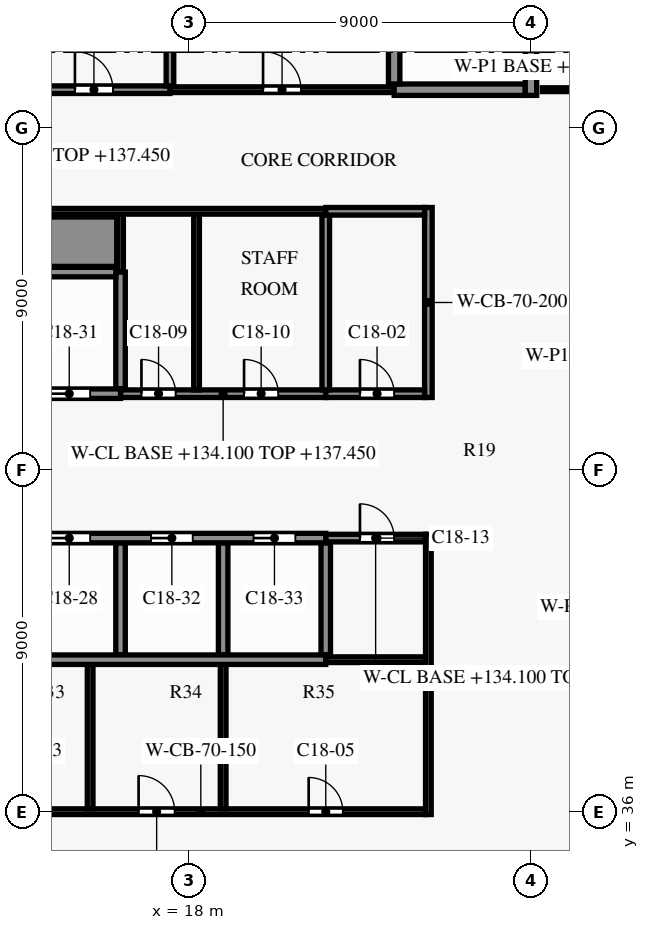
"""IFC4 building model, lengths in metres.
Left out: names, types, materials, properties, quantities, classifications, styles, units other than length and angle.
Written with IfcOpenShell. Run it as: python <this file> out.ifc"""

import sys

from ifc_helpers import new_model, si_unit, direction, frame, frame_2d, origin, place, context, subcontext, project, spatial, rectangle, extrude, element, fill, save


model = new_model("IFC4")
c1 = context("Model", 3, precision=1e-05, world=origin(), true_north=direction((0.0, 1.0)))
c2 = subcontext(c1, "Body", "Model", "MODEL_VIEW")
j1 = project(units=[si_unit("LENGTHUNIT", "METRE"), si_unit("PLANEANGLEUNIT", "RADIAN")], contexts=[c1])
p1 = place(None, origin())
s1 = spatial("IfcSite", under=j1, at=p1, CompositionType="ELEMENT")
p2 = place(p1, origin())
s2 = spatial("IfcBuilding", under=s1, at=p2, CompositionType="ELEMENT")
p3 = place(p2, frame((0.0, 0.0, 134.1)))
s3 = spatial("IfcBuildingStorey", under=s2, at=p3, CompositionType="ELEMENT", Elevation=134.1)
p4 = place(p3, frame((12.4, 36.0, 0.0), z_axis=(0.0, 0.0, 1.0), x_axis=(1.0, 0.0, 0.0)))
e1 = element("IfcWall", 1, at=p4, inside=s3, PredefinedType="SHEAR", context=c2, shape_type="SweptSolid", body=[
    extrude(rectangle(XDim=11.825, YDim=0.15, at=frame_2d((5.913, 0.0))), origin(), (0.0, 0.0, 1.0), 3.5),
])
p5 = place(p4, frame((1.05, 0.0, 0.0)))
e2 = element("IfcOpeningElement", 2, at=p5, cuts=e1, PredefinedType="OPENING", context=c2, shape_type="SweptSolid", body=[
    extrude(rectangle(XDim=0.9, YDim=2.1, at=frame_2d((0.45, 1.05))), frame((0.0, 0.085, 0.0), z_axis=(0.0, -1.0, 0.0), x_axis=(1.0, 0.0, 0.0)), (0.0, 0.0, 1.0), 0.17),
])
p6 = place(p4, frame((4.275, 0.0, 0.0)))
e3 = element("IfcOpeningElement", 3, at=p6, cuts=e1, PredefinedType="OPENING", context=c2, shape_type="SweptSolid", body=[
    extrude(rectangle(XDim=0.95, YDim=2.1, at=frame_2d((0.475, 1.05))), frame((0.0, 0.085, 0.0), z_axis=(0.0, -1.0, 0.0), x_axis=(1.0, 0.0, 0.0)), (0.0, 0.0, 1.0), 0.17),
])
p7 = place(p4, frame((8.75, 0.0, 0.0)))
e4 = element("IfcOpeningElement", 4, at=p7, cuts=e1, PredefinedType="OPENING", context=c2, shape_type="SweptSolid", body=[
    extrude(rectangle(XDim=0.9, YDim=2.1, at=frame_2d((0.45, 1.05))), frame((0.0, 0.085, 0.0), z_axis=(0.0, -1.0, 0.0), x_axis=(1.0, 0.0, 0.0)), (0.0, 0.0, 1.0), 0.17),
])
p8 = place(p3, frame((21.6, 40.0, 0.0), z_axis=(0.0, 0.0, 1.0), x_axis=(1.0, 0.0, 0.0)))
e5 = element("IfcWall", 5, at=p8, inside=s3, PredefinedType="PARTITIONING", context=c2, shape_type="SweptSolid", body=[
    extrude(rectangle(XDim=2.625, YDim=0.15, at=frame_2d((1.312, 0.0))), origin(), (0.0, 0.0, 1.0), 3.35),
])
p9 = place(p3, frame((8.1, 40.0, 0.0), z_axis=(0.0, 0.0, 1.0), x_axis=(1.0, 0.0, 0.0)))
e6 = element("IfcWall", 6, at=p9, inside=s3, PredefinedType="SHEAR", context=c2, shape_type="SweptSolid", body=[
    extrude(rectangle(XDim=13.5, YDim=0.25, at=frame_2d((6.75, 0.0))), origin(), (0.0, 0.0, 1.0), 3.5),
])
p10 = place(p3, frame((21.6, 43.2, 0.0), z_axis=(0.0, 0.0, 1.0), x_axis=(1.0, 0.0, 0.0)))
e7 = element("IfcWall", 7, at=p10, inside=s3, PredefinedType="PARTITIONING", context=c2, shape_type="SweptSolid", body=[
    extrude(rectangle(XDim=2.625, YDim=0.2, at=frame_2d((1.312, 0.0))), origin(), (0.0, 0.0, 1.0), 3.35),
])
p11 = place(p10, frame((0.9, 0.0, 0.0)))
e8 = element("IfcOpeningElement", 8, at=p11, cuts=e7, PredefinedType="OPENING", context=c2, shape_type="SweptSolid", body=[
    extrude(rectangle(XDim=0.9, YDim=2.1, at=frame_2d((0.45, 1.05))), frame((0.0, 0.11, 0.0), z_axis=(0.0, -1.0, 0.0), x_axis=(1.0, 0.0, 0.0)), (0.0, 0.0, 1.0), 0.22),
])
p12 = place(p3, frame((8.1, 43.2, 0.0), z_axis=(0.0, 0.0, 1.0), x_axis=(1.0, 0.0, 0.0)))
e9 = element("IfcWall", 9, at=p12, inside=s3, PredefinedType="SHEAR", context=c2, shape_type="SweptSolid", body=[
    extrude(rectangle(XDim=13.5, YDim=0.25, at=frame_2d((6.75, 0.0))), origin(), (0.0, 0.0, 1.0), 3.5),
])
p13 = place(p12, frame((0.8, 0.0, 0.0)))
e10 = element("IfcOpeningElement", 10, at=p13, cuts=e9, PredefinedType="OPENING", context=c2, shape_type="SweptSolid", body=[
    extrude(rectangle(XDim=1.1, YDim=2.1, at=frame_2d((0.55, 1.05))), frame((0.0, 0.135, 0.0), z_axis=(0.0, -1.0, 0.0), x_axis=(1.0, 0.0, 0.0)), (0.0, 0.0, 1.0), 0.27),
])
p14 = place(p12, frame((3.5, 0.0, 0.0)))
e11 = element("IfcOpeningElement", 11, at=p14, cuts=e9, PredefinedType="OPENING", context=c2, shape_type="SweptSolid", body=[
    extrude(rectangle(XDim=1.1, YDim=2.1, at=frame_2d((0.55, 1.05))), frame((0.0, 0.135, 0.0), z_axis=(0.0, -1.0, 0.0), x_axis=(1.0, 0.0, 0.0)), (0.0, 0.0, 1.0), 0.27),
])
p15 = place(p12, frame((6.2, 0.0, 0.0)))
e12 = element("IfcOpeningElement", 12, at=p15, cuts=e9, PredefinedType="OPENING", context=c2, shape_type="SweptSolid", body=[
    extrude(rectangle(XDim=1.1, YDim=2.1, at=frame_2d((0.55, 1.05))), frame((0.0, 0.135, 0.0), z_axis=(0.0, -1.0, 0.0), x_axis=(1.0, 0.0, 0.0)), (0.0, 0.0, 1.0), 0.27),
])
p16 = place(p12, frame((8.9, 0.0, 0.0)))
e13 = element("IfcOpeningElement", 13, at=p16, cuts=e9, PredefinedType="OPENING", context=c2, shape_type="SweptSolid", body=[
    extrude(rectangle(XDim=1.1, YDim=2.1, at=frame_2d((0.55, 1.05))), frame((0.0, 0.135, 0.0), z_axis=(0.0, -1.0, 0.0), x_axis=(1.0, 0.0, 0.0)), (0.0, 0.0, 1.0), 0.27),
])
p17 = place(p12, frame((11.6, 0.0, 0.0)))
e14 = element("IfcOpeningElement", 14, at=p17, cuts=e9, PredefinedType="OPENING", context=c2, shape_type="SweptSolid", body=[
    extrude(rectangle(XDim=1.1, YDim=2.1, at=frame_2d((0.55, 1.05))), frame((0.0, 0.135, 0.0), z_axis=(0.0, -1.0, 0.0), x_axis=(1.0, 0.0, 0.0)), (0.0, 0.0, 1.0), 0.27),
])
p18 = place(p3, frame((16.2, 47.0, 0.0), z_axis=(0.0, 0.0, 1.0), x_axis=(1.0, 0.0, 0.0)))
e15 = element("IfcWall", 15, at=p18, inside=s3, PredefinedType="PARTITIONING", context=c2, shape_type="SweptSolid", body=[
    extrude(rectangle(XDim=5.4, YDim=0.2, at=frame_2d((2.7, 0.0))), origin(), (0.0, 0.0, 1.0), 3.35),
])
p19 = place(p18, frame((0.55, 0.0, 0.0)))
e16 = element("IfcOpeningElement", 16, at=p19, cuts=e15, PredefinedType="OPENING", context=c2, shape_type="SweptSolid", body=[
    extrude(rectangle(XDim=0.9, YDim=2.1, at=frame_2d((0.45, 1.05))), frame((0.0, 0.11, 0.0), z_axis=(0.0, -1.0, 0.0), x_axis=(1.0, 0.0, 0.0)), (0.0, 0.0, 1.0), 0.22),
])
p20 = place(p18, frame((3.25, 0.0, 0.0)))
e17 = element("IfcOpeningElement", 17, at=p20, cuts=e15, PredefinedType="OPENING", context=c2, shape_type="SweptSolid", body=[
    extrude(rectangle(XDim=0.9, YDim=2.1, at=frame_2d((0.45, 1.05))), frame((0.0, 0.11, 0.0), z_axis=(0.0, -1.0, 0.0), x_axis=(1.0, 0.0, 0.0)), (0.0, 0.0, 1.0), 0.22),
])
p21 = place(p3, frame((21.6, 47.0, 0.0), z_axis=(0.0, 0.0, 1.0), x_axis=(1.0, 0.0, 0.0)))
e18 = element("IfcWall", 18, at=p21, inside=s3, PredefinedType="PARTITIONING", context=c2, shape_type="SweptSolid", body=[
    extrude(rectangle(XDim=2.6, YDim=0.2, at=frame_2d((1.3, 0.0))), origin(), (0.0, 0.0, 1.0), 3.35),
])
p22 = place(p21, frame((0.9, 0.0, 0.0)))
e19 = element("IfcOpeningElement", 19, at=p22, cuts=e18, PredefinedType="OPENING", context=c2, shape_type="SweptSolid", body=[
    extrude(rectangle(XDim=0.9, YDim=2.1, at=frame_2d((0.45, 1.05))), frame((0.0, 0.11, 0.0), z_axis=(0.0, -1.0, 0.0), x_axis=(1.0, 0.0, 0.0)), (0.0, 0.0, 1.0), 0.22),
])
p23 = place(p3, frame((8.1, 47.0, 0.0), z_axis=(0.0, 0.0, 1.0), x_axis=(1.0, 0.0, 0.0)))
e20 = element("IfcWall", 20, at=p23, inside=s3, PredefinedType="SHEAR", context=c2, shape_type="SweptSolid", body=[
    extrude(rectangle(XDim=8.1, YDim=0.25, at=frame_2d((4.05, 0.0))), origin(), (0.0, 0.0, 1.0), 3.5),
])
p24 = place(p23, frame((0.8, 0.0, 0.0)))
e21 = element("IfcOpeningElement", 21, at=p24, cuts=e20, PredefinedType="OPENING", context=c2, shape_type="SweptSolid", body=[
    extrude(rectangle(XDim=1.1, YDim=2.1, at=frame_2d((0.55, 1.05))), frame((0.0, 0.135, 0.0), z_axis=(0.0, -1.0, 0.0), x_axis=(1.0, 0.0, 0.0)), (0.0, 0.0, 1.0), 0.27),
])
p25 = place(p23, frame((3.5, 0.0, 0.0)))
e22 = element("IfcOpeningElement", 22, at=p25, cuts=e20, PredefinedType="OPENING", context=c2, shape_type="SweptSolid", body=[
    extrude(rectangle(XDim=1.1, YDim=2.1, at=frame_2d((0.55, 1.05))), frame((0.0, 0.135, 0.0), z_axis=(0.0, -1.0, 0.0), x_axis=(1.0, 0.0, 0.0)), (0.0, 0.0, 1.0), 0.27),
])
p26 = place(p23, frame((6.2, 0.0, 0.0)))
e23 = element("IfcOpeningElement", 23, at=p26, cuts=e20, PredefinedType="OPENING", context=c2, shape_type="SweptSolid", body=[
    extrude(rectangle(XDim=1.1, YDim=2.1, at=frame_2d((0.55, 1.05))), frame((0.0, 0.135, 0.0), z_axis=(0.0, -1.0, 0.0), x_axis=(1.0, 0.0, 0.0)), (0.0, 0.0, 1.0), 0.27),
])
p27 = place(p3, frame((8.1, 50.2, 0.0), z_axis=(0.0, 0.0, 1.0), x_axis=(1.0, 0.0, 0.0)))
e24 = element("IfcWall", 24, at=p27, inside=s3, PredefinedType="SHEAR", context=c2, shape_type="SweptSolid", body=[
    extrude(rectangle(XDim=7.975, YDim=0.25, at=frame_2d((3.987, 0.0))), origin(), (0.0, 0.0, 1.0), 3.5),
])
p28 = place(p3, frame((-0.125, 51.0, 0.0), z_axis=(0.0, 0.0, 1.0), x_axis=(1.0, 0.0, 0.0)))
e25 = element("IfcWall", 25, at=p28, inside=s3, PredefinedType="SHEAR", context=c2, shape_type="SweptSolid", body=[
    extrude(rectangle(XDim=16.225, YDim=1.3, at=frame_2d((8.113, 0.0))), origin(), (0.0, 0.0, 1.0), 3.5),
])
p29 = place(p3, frame((8.1, 51.8, 0.0), z_axis=(0.0, 0.0, 1.0), x_axis=(1.0, 0.0, 0.0)))
e26 = element("IfcWall", 26, at=p29, inside=s3, PredefinedType="PARTITIONING", context=c2, shape_type="SweptSolid", body=[
    extrude(rectangle(XDim=13.5, YDim=0.15, at=frame_2d((6.75, 0.0))), origin(), (0.0, 0.0, 1.0), 3.35),
])
p30 = place(p3, frame((21.6, 51.8, 0.0), z_axis=(0.0, 0.0, 1.0), x_axis=(1.0, 0.0, 0.0)))
e27 = element("IfcWall", 27, at=p30, inside=s3, PredefinedType="PARTITIONING", context=c2, shape_type="SweptSolid", body=[
    extrude(rectangle(XDim=2.6, YDim=0.2, at=frame_2d((1.3, 0.0))), origin(), (0.0, 0.0, 1.0), 3.35),
])
p31 = place(p3, frame((17.5, 55.0, 0.0), z_axis=(0.0, 0.0, 1.0), x_axis=(1.0, 0.0, 0.0)))
e28 = element("IfcWall", 28, at=p31, inside=s3, PredefinedType="PARTITIONING", context=c2, shape_type="SweptSolid", body=[
    extrude(rectangle(XDim=5.9, YDim=0.15, at=frame_2d((2.95, 0.0))), origin(), (0.0, 0.0, 1.0), 3.35),
])
p32 = place(p31, frame((2.45, 0.0, 0.0)))
e29 = element("IfcOpeningElement", 29, at=p32, cuts=e28, PredefinedType="OPENING", context=c2, shape_type="SweptSolid", body=[
    extrude(rectangle(XDim=1.0, YDim=2.1, at=frame_2d((0.5, 1.05))), frame((0.0, 0.085, 0.0), z_axis=(0.0, -1.0, 0.0), x_axis=(1.0, 0.0, 0.0)), (0.0, 0.0, 1.0), 0.17),
])
p33 = place(p3, frame((13.5, 55.0, 0.0), z_axis=(0.0, 0.0, 1.0), x_axis=(1.0, 0.0, 0.0)))
e30 = element("IfcWall", 30, at=p33, inside=s3, PredefinedType="PARTITIONING", context=c2, shape_type="SweptSolid", body=[
    extrude(rectangle(XDim=4.0, YDim=0.2, at=frame_2d((2.0, 0.0))), origin(), (0.0, 0.0, 1.0), 3.35),
])
p34 = place(p33, frame((1.5, 0.0, 0.0)))
e31 = element("IfcOpeningElement", 31, at=p34, cuts=e30, PredefinedType="OPENING", context=c2, shape_type="SweptSolid", body=[
    extrude(rectangle(XDim=1.0, YDim=2.1, at=frame_2d((0.5, 1.05))), frame((0.0, 0.11, 0.0), z_axis=(0.0, -1.0, 0.0), x_axis=(1.0, 0.0, 0.0)), (0.0, 0.0, 1.0), 0.22),
])
p35 = place(p3, frame((23.4, 55.0, 0.0), z_axis=(0.0, 0.0, 1.0), x_axis=(1.0, 0.0, 0.0)))
e32 = element("IfcWall", 32, at=p35, inside=s3, PredefinedType="SHEAR", context=c2, shape_type="SweptSolid", body=[
    extrude(rectangle(XDim=3.45, YDim=0.3, at=frame_2d((1.725, 0.0))), origin(), (0.0, 0.0, 1.0), 3.5),
])
p36 = place(p3, frame((15.4, 36.075, 0.0), z_axis=(0.0, 0.0, 1.0), x_axis=(0.0, 1.0, 0.0)))
e33 = element("IfcWall", 33, at=p36, inside=s3, PredefinedType="PARTITIONING", context=c2, shape_type="SweptSolid", body=[
    extrude(rectangle(XDim=3.8, YDim=0.15, at=frame_2d((1.9, 0.0))), origin(), (0.0, 0.0, 1.0), 3.35),
])
p37 = place(p3, frame((16.2, 50.2, 0.0), z_axis=(0.0, 0.0, 1.0), x_axis=(0.0, 1.0, 0.0)))
e34 = element("IfcWall", 34, at=p37, inside=s3, PredefinedType="PARTITIONING", context=c2, shape_type="SweptSolid", body=[
    extrude(rectangle(XDim=1.525, YDim=0.15, at=frame_2d((0.763, 0.0))), origin(), (0.0, 0.0, 1.0), 3.35),
])
p38 = place(p3, frame((16.2, 40.125, 0.0), z_axis=(0.0, 0.0, 1.0), x_axis=(0.0, 1.0, 0.0)))
e35 = element("IfcWall", 35, at=p38, inside=s3, PredefinedType="SHEAR", context=c2, shape_type="SweptSolid", body=[
    extrude(rectangle(XDim=2.95, YDim=0.25, at=frame_2d((1.475, 0.0))), origin(), (0.0, 0.0, 1.0), 3.5),
])
p39 = place(p3, frame((16.2, 47.125, 0.0), z_axis=(0.0, 0.0, 1.0), x_axis=(0.0, 1.0, 0.0)))
e36 = element("IfcWall", 36, at=p39, inside=s3, PredefinedType="SHEAR", context=c2, shape_type="SweptSolid", body=[
    extrude(rectangle(XDim=3.075, YDim=0.25, at=frame_2d((1.538, 0.0))), origin(), (0.0, 0.0, 1.0), 3.5),
])
p40 = place(p3, frame((17.5, 55.1, 0.0), z_axis=(0.0, 0.0, 1.0), x_axis=(0.0, 1.0, 0.0)))
e37 = element("IfcWall", 37, at=p40, inside=s3, PredefinedType="PARTITIONING", context=c2, shape_type="SweptSolid", body=[
    extrude(rectangle(XDim=7.05, YDim=0.2, at=frame_2d((3.525, 0.0))), origin(), (0.0, 0.0, 1.0), 3.35),
])
p41 = place(p3, frame((18.2, 47.1, 0.0), z_axis=(0.0, 0.0, 1.0), x_axis=(0.0, 1.0, 0.0)))
e38 = element("IfcWall", 38, at=p41, inside=s3, PredefinedType="PARTITIONING", context=c2, shape_type="SweptSolid", body=[
    extrude(rectangle(XDim=4.625, YDim=0.15, at=frame_2d((2.312, 0.0))), origin(), (0.0, 0.0, 1.0), 3.35),
])
p42 = place(p3, frame((18.9, 36.075, 0.0), z_axis=(0.0, 0.0, 1.0), x_axis=(0.0, 1.0, 0.0)))
e39 = element("IfcWall", 39, at=p42, inside=s3, PredefinedType="PARTITIONING", context=c2, shape_type="SweptSolid", body=[
    extrude(rectangle(XDim=3.8, YDim=0.15, at=frame_2d((1.9, 0.0))), origin(), (0.0, 0.0, 1.0), 3.35),
])
p43 = place(p3, frame((18.9, 40.125, 0.0), z_axis=(0.0, 0.0, 1.0), x_axis=(0.0, 1.0, 0.0)))
e40 = element("IfcWall", 40, at=p43, inside=s3, PredefinedType="SHEAR", context=c2, shape_type="SweptSolid", body=[
    extrude(rectangle(XDim=2.95, YDim=0.25, at=frame_2d((1.475, 0.0))), origin(), (0.0, 0.0, 1.0), 3.5),
])
p44 = place(p3, frame((21.6, 47.1, 0.0), z_axis=(0.0, 0.0, 1.0), x_axis=(0.0, 1.0, 0.0)))
e41 = element("IfcWall", 41, at=p44, inside=s3, PredefinedType="PARTITIONING", context=c2, shape_type="SweptSolid", body=[
    extrude(rectangle(XDim=4.6, YDim=0.2, at=frame_2d((2.3, 0.0))), origin(), (0.0, 0.0, 1.0), 3.35),
])
p45 = place(p3, frame((21.6, 40.125, 0.0), z_axis=(0.0, 0.0, 1.0), x_axis=(0.0, 1.0, 0.0)))
e42 = element("IfcWall", 42, at=p45, inside=s3, PredefinedType="SHEAR", context=c2, shape_type="SweptSolid", body=[
    extrude(rectangle(XDim=2.95, YDim=0.25, at=frame_2d((1.475, 0.0))), origin(), (0.0, 0.0, 1.0), 3.5),
])
p46 = place(p3, frame((23.4, 55.15, 0.0), z_axis=(0.0, 0.0, 1.0), x_axis=(0.0, 1.0, 0.0)))
e43 = element("IfcWall", 43, at=p46, inside=s3, PredefinedType="SHEAR", context=c2, shape_type="SweptSolid", body=[
    extrude(rectangle(XDim=8.0, YDim=0.3, at=frame_2d((4.0, 0.0))), origin(), (0.0, 0.0, 1.0), 3.5),
])
p47 = place(p3, frame((24.3, 35.925, 0.0), z_axis=(0.0, 0.0, 1.0), x_axis=(0.0, 1.0, 0.0)))
e44 = element("IfcWall", 44, at=p47, inside=s3, PredefinedType="PARTITIONING", context=c2, shape_type="SweptSolid", body=[
    extrude(rectangle(XDim=7.375, YDim=0.15, at=frame_2d((3.688, 0.0))), origin(), (0.0, 0.0, 1.0), 3.35),
])
p48 = place(p3, frame((24.3, 46.9, 0.0), z_axis=(0.0, 0.0, 1.0), x_axis=(0.0, 1.0, 0.0)))
e45 = element("IfcWall", 45, at=p48, inside=s3, PredefinedType="SHEAR", context=c2, shape_type="SweptSolid", body=[
    extrude(rectangle(XDim=5.0, YDim=0.2, at=frame_2d((2.5, 0.0))), origin(), (0.0, 0.0, 1.0), 3.5),
])
p49 = place(p3, frame((27.0, 54.85, 0.0), z_axis=(0.0, 0.0, 1.0), x_axis=(0.0, 1.0, 0.0)))
e46 = element("IfcWall", 46, at=p49, inside=s3, PredefinedType="SHEAR", context=c2, shape_type="SweptSolid", body=[
    extrude(rectangle(XDim=8.45, YDim=0.3, at=frame_2d((4.225, 0.0))), origin(), (0.0, 0.0, 1.0), 3.5),
])
p50 = place(p49, frame((6.55, 0.0, 0.0)))
e47 = element("IfcOpeningElement", 47, at=p50, cuts=e46, PredefinedType="OPENING", context=c2, shape_type="SweptSolid", body=[
    extrude(rectangle(XDim=1.2, YDim=2.2, at=frame_2d((0.6, 1.1))), frame((0.0, 0.16, 0.0), z_axis=(0.0, -1.0, 0.0), x_axis=(1.0, 0.0, 0.0)), (0.0, 0.0, 1.0), 0.32),
])
p51 = place(p3, frame((27.3, 55.0, 0.0), z_axis=(0.0, 0.0, 1.0), x_axis=(1.0, 0.0, 0.0)))
e48 = element("IfcWall", 48, at=p51, inside=s3, PredefinedType="PARTITIONING", context=c2, shape_type="SweptSolid", body=[
    extrude(rectangle(XDim=3.25, YDim=0.1, at=frame_2d((1.625, 0.0))), origin(), (0.0, 0.0, 1.0), 3.33),
])
p52 = place(p22, origin())
e49 = element("IfcDoor", 49, at=p52, inside=s3, OperationType="SINGLE_SWING_LEFT", PredefinedType="DOOR", context=c2, shape_type="SweptSolid", body=[
    extrude(rectangle(XDim=0.9, YDim=2.1, at=frame_2d((0.45, 1.05))), frame((0.0, 0.025, 0.0), z_axis=(0.0, -1.0, 0.0), x_axis=(1.0, 0.0, 0.0)), (0.0, 0.0, 1.0), 0.05),
])
fill(e19, e49)
p53 = place(p6, origin())
e50 = element("IfcDoor", 50, at=p53, inside=s3, OperationType="SINGLE_SWING_LEFT", PredefinedType="DOOR", context=c2, shape_type="SweptSolid", body=[
    extrude(rectangle(XDim=0.95, YDim=2.1, at=frame_2d((0.475, 1.05))), frame((0.0, 0.025, 0.0), z_axis=(0.0, -1.0, 0.0), x_axis=(1.0, 0.0, 0.0)), (0.0, 0.0, 1.0), 0.05),
])
fill(e3, e50)
p54 = place(p7, origin())
e51 = element("IfcDoor", 51, at=p54, inside=s3, OperationType="SINGLE_SWING_RIGHT", PredefinedType="DOOR", context=c2, shape_type="SweptSolid", body=[
    extrude(rectangle(XDim=0.9, YDim=2.1, at=frame_2d((0.45, 1.05))), frame((0.0, 0.025, 0.0), z_axis=(0.0, -1.0, 0.0), x_axis=(1.0, 0.0, 0.0)), (0.0, 0.0, 1.0), 0.05),
])
fill(e4, e51)
p55 = place(p19, origin())
e52 = element("IfcDoor", 52, at=p55, inside=s3, OperationType="SINGLE_SWING_LEFT", PredefinedType="DOOR", context=c2, shape_type="SweptSolid", body=[
    extrude(rectangle(XDim=0.9, YDim=2.1, at=frame_2d((0.45, 1.05))), frame((0.0, 0.025, 0.0), z_axis=(0.0, -1.0, 0.0), x_axis=(1.0, 0.0, 0.0)), (0.0, 0.0, 1.0), 0.05),
])
fill(e16, e52)
p56 = place(p20, origin())
e53 = element("IfcDoor", 53, at=p56, inside=s3, OperationType="SINGLE_SWING_RIGHT", PredefinedType="DOOR", context=c2, shape_type="SweptSolid", body=[
    extrude(rectangle(XDim=0.9, YDim=2.1, at=frame_2d((0.45, 1.05))), frame((0.0, 0.025, 0.0), z_axis=(0.0, -1.0, 0.0), x_axis=(1.0, 0.0, 0.0)), (0.0, 0.0, 1.0), 0.05),
])
fill(e17, e53)
p57 = place(p11, origin())
e54 = element("IfcDoor", 54, at=p57, inside=s3, OperationType="SINGLE_SWING_RIGHT", PredefinedType="DOOR", context=c2, shape_type="SweptSolid", body=[
    extrude(rectangle(XDim=0.9, YDim=2.1, at=frame_2d((0.45, 1.05))), frame((0.0, 0.025, 0.0), z_axis=(0.0, -1.0, 0.0), x_axis=(1.0, 0.0, 0.0)), (0.0, 0.0, 1.0), 0.05),
])
fill(e8, e54)
p58 = place(p34, origin())
e55 = element("IfcDoor", 55, at=p58, inside=s3, OperationType="SINGLE_SWING_LEFT", PredefinedType="DOOR", context=c2, shape_type="SweptSolid", body=[
    extrude(rectangle(XDim=1.0, YDim=2.1, at=frame_2d((0.5, 1.05))), frame((0.0, 0.025, 0.0), z_axis=(0.0, -1.0, 0.0), x_axis=(1.0, 0.0, 0.0)), (0.0, 0.0, 1.0), 0.05),
])
fill(e31, e55)
p59 = place(p32, origin())
e56 = element("IfcDoor", 56, at=p59, inside=s3, OperationType="SINGLE_SWING_RIGHT", PredefinedType="DOOR", context=c2, shape_type="SweptSolid", body=[
    extrude(rectangle(XDim=1.0, YDim=2.1, at=frame_2d((0.5, 1.05))), frame((0.0, 0.025, 0.0), z_axis=(0.0, -1.0, 0.0), x_axis=(1.0, 0.0, 0.0)), (0.0, 0.0, 1.0), 0.05),
])
fill(e29, e56)
p60 = place(p15, origin())
e57 = element("IfcDoor", 57, at=p60, inside=s3, OperationType="DOUBLE_DOOR_SLIDING", PredefinedType="DOOR", context=c2, shape_type="SweptSolid", body=[
    extrude(rectangle(XDim=1.1, YDim=2.1, at=frame_2d((0.55, 1.05))), frame((0.0, 0.025, 0.0), z_axis=(0.0, -1.0, 0.0), x_axis=(1.0, 0.0, 0.0)), (0.0, 0.0, 1.0), 0.05),
])
fill(e12, e57)
p61 = place(p26, origin())
e58 = element("IfcDoor", 58, at=p61, inside=s3, OperationType="DOUBLE_DOOR_SLIDING", PredefinedType="DOOR", context=c2, shape_type="SweptSolid", body=[
    extrude(rectangle(XDim=1.1, YDim=2.1, at=frame_2d((0.55, 1.05))), frame((0.0, 0.025, 0.0), z_axis=(0.0, -1.0, 0.0), x_axis=(1.0, 0.0, 0.0)), (0.0, 0.0, 1.0), 0.05),
])
fill(e23, e58)
p62 = place(p16, origin())
e59 = element("IfcDoor", 59, at=p62, inside=s3, OperationType="DOUBLE_DOOR_SLIDING", PredefinedType="DOOR", context=c2, shape_type="SweptSolid", body=[
    extrude(rectangle(XDim=1.1, YDim=2.1, at=frame_2d((0.55, 1.05))), frame((0.0, 0.025, 0.0), z_axis=(0.0, -1.0, 0.0), x_axis=(1.0, 0.0, 0.0)), (0.0, 0.0, 1.0), 0.05),
])
fill(e13, e59)
p63 = place(p17, origin())
e60 = element("IfcDoor", 60, at=p63, inside=s3, OperationType="DOUBLE_DOOR_SLIDING", PredefinedType="DOOR", context=c2, shape_type="SweptSolid", body=[
    extrude(rectangle(XDim=1.1, YDim=2.1, at=frame_2d((0.55, 1.05))), frame((0.0, 0.025, 0.0), z_axis=(0.0, -1.0, 0.0), x_axis=(1.0, 0.0, 0.0)), (0.0, 0.0, 1.0), 0.05),
])
fill(e14, e60)
save(model, sys.argv[1])
